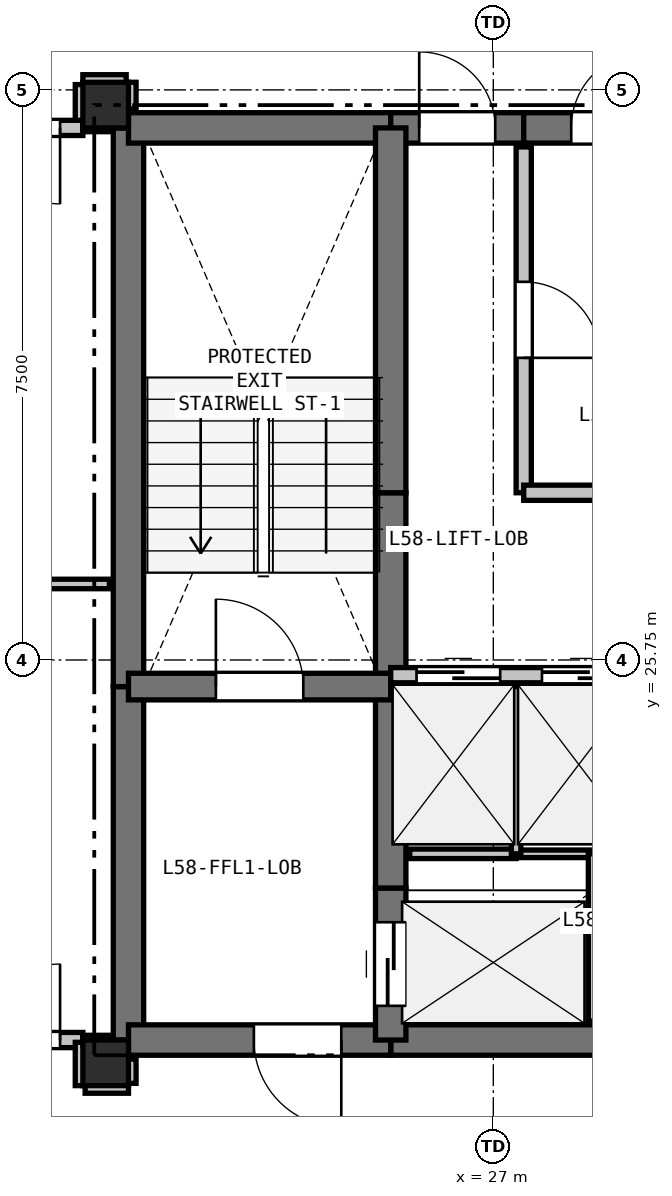
"""IFC4 building model, lengths in metres.
Left out: names, types, materials, properties, quantities, classifications, styles, units other than length and angle.
Written with IfcOpenShell. Run it as: python <this file> out.ifc"""

import sys

from ifc_helpers import new_model, si_unit, direction, frame, frame_2d, origin, origin_2d, place, context, subcontext, project, spatial, rectangle, extrude, element, fill, save


model = new_model("IFC4")
c1 = context("Model", 3, precision=1e-05, world=origin(), true_north=direction((0.0, 1.0)))
c2 = subcontext(c1, "Body", "Model", "MODEL_VIEW")
j1 = project(units=[si_unit("LENGTHUNIT", "METRE"), si_unit("PLANEANGLEUNIT", "RADIAN")], contexts=[c1])
p1 = place(None, origin())
s1 = spatial("IfcSite", under=j1, at=p1, CompositionType="ELEMENT")
p2 = place(p1, origin())
s2 = spatial("IfcBuilding", under=s1, at=p2, CompositionType="ELEMENT")
p3 = place(p2, frame((0.0, 0.0, 208.5)))
s3 = spatial("IfcBuildingStorey", under=s2, at=p3, CompositionType="ELEMENT", Elevation=208.5)
for number, where, z_axis, x_axis in (
    (1, (21.9, 20.45, 0.0), (0.0, 0.0, 1.0), (1.0, 0.0, 0.0)),
    (2, (21.9, 33.05, 0.0), (0.0, 0.0, 1.0), (1.0, 0.0, 0.0)),
):
    element("IfcColumn", number, at=place(p3, frame(where, z_axis=z_axis, x_axis=x_axis)), inside=s3, PredefinedType="COLUMN", context=c2, shape_type="SweptSolid", body=[
        extrude(rectangle(XDim=0.6, YDim=0.6, at=origin_2d()), origin(), (0.0, 0.0, 1.0), 3.3),
    ])
p4 = place(p3, frame((22.2, 20.75, 0.0), z_axis=(0.0, 0.0, 1.0), x_axis=(0.0, 1.0, 0.0)))
e3 = element("IfcWall", 3, at=p4, inside=s3, PredefinedType="SHEAR", context=c2, shape_type="SweptSolid", body=[
    extrude(rectangle(XDim=4.65, YDim=0.4, at=frame_2d((2.325, 0.0))), origin(), (0.0, 0.0, 1.0), 3.07),
])
p5 = place(p3, frame((22.2, 25.4, 0.0), z_axis=(0.0, 0.0, 1.0), x_axis=(0.0, 1.0, 0.0)))
e4 = element("IfcWall", 4, at=p5, inside=s3, PredefinedType="SHEAR", context=c2, shape_type="SweptSolid", body=[
    extrude(rectangle(XDim=7.35, YDim=0.4, at=frame_2d((3.675, 0.0))), origin(), (0.0, 0.0, 1.0), 3.07),
])
p6 = place(p3, frame((22.2, 32.75, 0.0), z_axis=(0.0, 0.0, 1.0), x_axis=(1.0, 0.0, 0.0)))
e5 = element("IfcWall", 5, at=p6, inside=s3, PredefinedType="SHEAR", context=c2, shape_type="SweptSolid", body=[
    extrude(rectangle(XDim=3.45, YDim=0.4, at=frame_2d((1.725, 0.0))), origin(), (0.0, 0.0, 1.0), 3.07),
])
p7 = place(p3, frame((25.65, 32.75, 0.0), z_axis=(0.0, 0.0, 1.0), x_axis=(1.0, 0.0, 0.0)))
e6 = element("IfcWall", 6, at=p7, inside=s3, PredefinedType="SHEAR", context=c2, shape_type="SweptSolid", body=[
    extrude(rectangle(XDim=1.75, YDim=0.4, at=frame_2d((0.875, 0.0))), origin(), (0.0, 0.0, 1.0), 3.07),
])
p8 = place(p7, frame((0.375, 0.0, 0.0)))
e7 = element("IfcOpeningElement", 7, at=p8, cuts=e6, PredefinedType="OPENING", context=c2, shape_type="SweptSolid", body=[
    extrude(rectangle(XDim=1.0, YDim=2.15, at=frame_2d((0.5, 1.075))), frame((0.0, 0.21, 0.0), z_axis=(0.0, -1.0, 0.0), x_axis=(1.0, 0.0, 0.0)), (0.0, 0.0, 1.0), 0.42),
])
p9 = place(p3, frame((27.4, 32.75, 0.0), z_axis=(0.0, 0.0, 1.0), x_axis=(1.0, 0.0, 0.0)))
e8 = element("IfcWall", 8, at=p9, inside=s3, PredefinedType="SHEAR", context=c2, shape_type="SweptSolid", body=[
    extrude(rectangle(XDim=2.25, YDim=0.4, at=frame_2d((1.125, 0.0))), origin(), (0.0, 0.0, 1.0), 3.07),
])
p10 = place(p9, frame((0.625, 0.0, 0.0)))
e9 = element("IfcOpeningElement", 9, at=p10, cuts=e8, PredefinedType="OPENING", context=c2, shape_type="SweptSolid", body=[
    extrude(rectangle(XDim=1.0, YDim=2.15, at=frame_2d((0.5, 1.075))), frame((0.0, 0.21, 0.0), z_axis=(0.0, -1.0, 0.0), x_axis=(1.0, 0.0, 0.0)), (0.0, 0.0, 1.0), 0.42),
])
p11 = place(p3, frame((28.35, 20.75, 0.0), z_axis=(0.0, 0.0, 1.0), x_axis=(-1.0, 0.0, 0.0)))
e10 = element("IfcWall", 10, at=p11, inside=s3, PredefinedType="SHEAR", context=c2, shape_type="SweptSolid", body=[
    extrude(rectangle(XDim=2.7, YDim=0.4, at=frame_2d((1.35, 0.0))), origin(), (0.0, 0.0, 1.0), 3.07),
])
p12 = place(p3, frame((25.65, 20.75, 0.0), z_axis=(0.0, 0.0, 1.0), x_axis=(-1.0, 0.0, 0.0)))
e11 = element("IfcWall", 11, at=p12, inside=s3, PredefinedType="SHEAR", context=c2, shape_type="SweptSolid", body=[
    extrude(rectangle(XDim=3.45, YDim=0.4, at=frame_2d((1.725, 0.0))), origin(), (0.0, 0.0, 1.0), 3.07),
])
p13 = place(p12, frame((0.65, 0.0, 0.0)))
e12 = element("IfcOpeningElement", 12, at=p13, cuts=e11, PredefinedType="OPENING", context=c2, shape_type="SweptSolid", body=[
    extrude(rectangle(XDim=1.15, YDim=2.15, at=frame_2d((0.575, 1.075))), frame((0.0, 0.21, 0.0), z_axis=(0.0, -1.0, 0.0), x_axis=(1.0, 0.0, 0.0)), (0.0, 0.0, 1.0), 0.42),
])
p14 = place(p3, frame((25.65, 20.75, 0.0), z_axis=(0.0, 0.0, 1.0), x_axis=(0.0, 1.0, 0.0)))
e13 = element("IfcWall", 13, at=p14, inside=s3, PredefinedType="SHEAR", context=c2, shape_type="SweptSolid", body=[
    extrude(rectangle(XDim=2.0, YDim=0.4, at=frame_2d((1.0, 0.0))), origin(), (0.0, 0.0, 1.0), 3.07),
])
p15 = place(p14, frame((0.45, 0.0, 0.0)))
e14 = element("IfcOpeningElement", 14, at=p15, cuts=e13, PredefinedType="OPENING", context=c2, shape_type="SweptSolid", body=[
    extrude(rectangle(XDim=1.1, YDim=2.15, at=frame_2d((0.55, 1.075))), frame((0.0, 0.21, 0.0), z_axis=(0.0, -1.0, 0.0), x_axis=(1.0, 0.0, 0.0)), (0.0, 0.0, 1.0), 0.42),
])
p16 = place(p3, frame((25.65, 22.75, 0.0), z_axis=(0.0, 0.0, 1.0), x_axis=(0.0, 1.0, 0.0)))
e15 = element("IfcWall", 15, at=p16, inside=s3, PredefinedType="SHEAR", context=c2, shape_type="SweptSolid", body=[
    extrude(rectangle(XDim=2.8, YDim=0.4, at=frame_2d((1.4, 0.0))), origin(), (0.0, 0.0, 1.0), 3.07),
])
p17 = place(p3, frame((25.65, 25.55, 0.0), z_axis=(0.0, 0.0, 1.0), x_axis=(0.0, 1.0, 0.0)))
e16 = element("IfcWall", 16, at=p17, inside=s3, PredefinedType="SHEAR", context=c2, shape_type="SweptSolid", body=[
    extrude(rectangle(XDim=2.4, YDim=0.4, at=frame_2d((1.2, 0.0))), origin(), (0.0, 0.0, 1.0), 3.07),
])
p18 = place(p3, frame((25.65, 27.95, 0.0), z_axis=(0.0, 0.0, 1.0), x_axis=(0.0, 1.0, 0.0)))
e17 = element("IfcWall", 17, at=p18, inside=s3, PredefinedType="SHEAR", context=c2, shape_type="SweptSolid", body=[
    extrude(rectangle(XDim=4.8, YDim=0.4, at=frame_2d((2.4, 0.0))), origin(), (0.0, 0.0, 1.0), 3.07),
])
p19 = place(p3, frame((22.2, 25.4, 0.0), z_axis=(0.0, 0.0, 1.0), x_axis=(1.0, 0.0, 0.0)))
e18 = element("IfcWall", 18, at=p19, inside=s3, PredefinedType="SHEAR", context=c2, shape_type="SweptSolid", body=[
    extrude(rectangle(XDim=3.45, YDim=0.35, at=frame_2d((1.725, 0.0))), origin(), (0.0, 0.0, 1.0), 3.07),
])
p20 = place(p19, frame((1.15, 0.0, 0.0)))
e19 = element("IfcOpeningElement", 19, at=p20, cuts=e18, PredefinedType="OPENING", context=c2, shape_type="SweptSolid", body=[
    extrude(rectangle(XDim=1.15, YDim=2.15, at=frame_2d((0.575, 1.075))), frame((0.0, 0.185, 0.0), z_axis=(0.0, -1.0, 0.0), x_axis=(1.0, 0.0, 0.0)), (0.0, 0.0, 1.0), 0.37),
])
p21 = place(p3, frame((25.65, 25.55, 0.0), z_axis=(0.0, 0.0, 1.0), x_axis=(1.0, 0.0, 0.0)))
e20 = element("IfcWall", 20, at=p21, inside=s3, PredefinedType="PARTITIONING", context=c2, shape_type="SweptSolid", body=[
    extrude(rectangle(XDim=4.95, YDim=0.2, at=frame_2d((2.475, 0.0))), origin(), (0.0, 0.0, 1.0), 3.07),
])
p22 = place(p21, frame((0.34, 0.0, 0.0)))
e21 = element("IfcOpeningElement", 21, at=p22, cuts=e20, PredefinedType="OPENING", context=c2, shape_type="SweptSolid", body=[
    extrude(rectangle(XDim=1.1, YDim=2.15, at=frame_2d((0.55, 1.075))), frame((0.0, 0.11, 0.0), z_axis=(0.0, -1.0, 0.0), x_axis=(1.0, 0.0, 0.0)), (0.0, 0.0, 1.0), 0.22),
])
p23 = place(p21, frame((1.99, 0.0, 0.0)))
e22 = element("IfcOpeningElement", 22, at=p23, cuts=e20, PredefinedType="OPENING", context=c2, shape_type="SweptSolid", body=[
    extrude(rectangle(XDim=1.1, YDim=2.15, at=frame_2d((0.55, 1.075))), frame((0.0, 0.11, 0.0), z_axis=(0.0, -1.0, 0.0), x_axis=(1.0, 0.0, 0.0)), (0.0, 0.0, 1.0), 0.22),
])
p24 = place(p21, frame((3.64, 0.0, 0.0)))
e23 = element("IfcOpeningElement", 23, at=p24, cuts=e20, PredefinedType="OPENING", context=c2, shape_type="SweptSolid", body=[
    extrude(rectangle(XDim=1.1, YDim=2.15, at=frame_2d((0.55, 1.075))), frame((0.0, 0.11, 0.0), z_axis=(0.0, -1.0, 0.0), x_axis=(1.0, 0.0, 0.0)), (0.0, 0.0, 1.0), 0.22),
])
p25 = place(p3, frame((25.9, 23.2, 0.0), z_axis=(0.0, 0.0, 1.0), x_axis=(1.0, 0.0, 0.0)))
e24 = element("IfcWall", 24, at=p25, inside=s3, PredefinedType="PARTITIONING", context=c2, shape_type="SweptSolid", body=[
    extrude(rectangle(XDim=1.4, YDim=0.125, at=frame_2d((0.7, 0.0))), origin(), (0.0, 0.0, 1.0), 3.07),
])
p26 = place(p3, frame((27.3, 23.2, 0.0), z_axis=(0.0, 0.0, 1.0), x_axis=(1.0, 0.0, 0.0)))
e25 = element("IfcWall", 25, at=p26, inside=s3, PredefinedType="PARTITIONING", context=c2, shape_type="SweptSolid", body=[
    extrude(rectangle(XDim=1.05, YDim=0.1, at=frame_2d((0.525, 0.0))), origin(), (0.0, 0.0, 1.0), 3.07),
])
p27 = place(p3, frame((28.35, 23.2, 0.0), z_axis=(0.0, 0.0, 1.0), x_axis=(0.0, -1.0, 0.0)))
e26 = element("IfcWall", 26, at=p27, inside=s3, PredefinedType="PARTITIONING", context=c2, shape_type="SweptSolid", body=[
    extrude(rectangle(XDim=2.2, YDim=0.2, at=frame_2d((1.1, 0.0))), origin(), (0.0, 0.0, 1.0), 3.07),
])
p28 = place(p3, frame((27.3, 25.4, 0.0), z_axis=(0.0, 0.0, 1.0), x_axis=(0.0, -1.0, 0.0)))
e27 = element("IfcWall", 27, at=p28, inside=s3, PredefinedType="PARTITIONING", context=c2, shape_type="SweptSolid", body=[
    extrude(rectangle(XDim=2.2, YDim=0.125, at=frame_2d((1.1, 0.0))), origin(), (0.0, 0.0, 1.0), 3.07),
])
p29 = place(p3, frame((27.4, 32.5, 0.0), z_axis=(0.0, 0.0, 1.0), x_axis=(0.0, -1.0, 0.0)))
e28 = element("IfcWall", 28, at=p29, inside=s3, PredefinedType="PARTITIONING", context=c2, shape_type="SweptSolid", body=[
    extrude(rectangle(XDim=4.55, YDim=0.2, at=frame_2d((2.275, 0.0))), origin(), (0.0, 0.0, 1.0), 3.07),
])
p30 = place(p29, frame((1.775, 0.0, 0.0)))
e29 = element("IfcOpeningElement", 29, at=p30, cuts=e28, PredefinedType="OPENING", context=c2, shape_type="SweptSolid", body=[
    extrude(rectangle(XDim=1.0, YDim=2.15, at=frame_2d((0.5, 1.075))), frame((0.0, 0.11, 0.0), z_axis=(0.0, -1.0, 0.0), x_axis=(1.0, 0.0, 0.0)), (0.0, 0.0, 1.0), 0.22),
])
p31 = place(p3, frame((27.4, 27.95, 0.0), z_axis=(0.0, 0.0, 1.0), x_axis=(1.0, 0.0, 0.0)))
e30 = element("IfcWall", 30, at=p31, inside=s3, PredefinedType="PARTITIONING", context=c2, shape_type="SweptSolid", body=[
    extrude(rectangle(XDim=2.45, YDim=0.2, at=frame_2d((1.225, 0.0))), origin(), (0.0, 0.0, 1.0), 3.07),
])
p32 = place(p3, frame((22.2, 33.0, 0.0), z_axis=(0.0, 0.0, 1.0), x_axis=(0.0, 1.0, 0.0)))
e31 = element("IfcWall", 31, at=p32, inside=s3, PredefinedType="PARTITIONING", context=c2, shape_type="SweptSolid", body=[
    extrude(rectangle(XDim=0.35, YDim=0.2, at=frame_2d((0.175, 0.0))), origin(), (0.0, 0.0, 1.0), 2.595),
])
p33 = place(p3, frame((22.17, 33.35, 0.0), z_axis=(0.0, 0.0, 1.0), x_axis=(-1.0, 0.0, 0.0)))
e32 = element("IfcWall", 32, at=p33, inside=s3, PredefinedType="PARTITIONING", context=c2, shape_type="SweptSolid", body=[
    extrude(rectangle(XDim=0.57, YDim=0.2, at=frame_2d((0.285, 0.0))), origin(), (0.0, 0.0, 1.0), 3.07),
])
p34 = place(p3, frame((21.6, 33.32, 0.0), z_axis=(0.0, 0.0, 1.0), x_axis=(0.0, -1.0, 0.0)))
e33 = element("IfcWall", 33, at=p34, inside=s3, PredefinedType="PARTITIONING", context=c2, shape_type="SweptSolid", body=[
    extrude(rectangle(XDim=0.57, YDim=0.2, at=frame_2d((0.285, 0.0))), origin(), (0.0, 0.0, 1.0), 2.518),
])
p35 = place(p3, frame((21.6, 32.75, 0.0), z_axis=(0.0, 0.0, 1.0), x_axis=(-1.0, 0.0, 0.0)))
e34 = element("IfcWall", 34, at=p35, inside=s3, PredefinedType="PARTITIONING", context=c2, shape_type="SweptSolid", body=[
    extrude(rectangle(XDim=1.6, YDim=0.2, at=frame_2d((0.8, 0.0))), origin(), (0.0, 0.0, 1.0), 2.518),
])
p36 = place(p35, frame((0.3, 0.0, 0.0)))
e35 = element("IfcOpeningElement", 35, at=p36, cuts=e34, PredefinedType="OPENING", context=c2, shape_type="SweptSolid", body=[
    extrude(rectangle(XDim=1.0, YDim=2.15, at=frame_2d((0.5, 1.075))), frame((0.0, 0.11, 0.0), z_axis=(0.0, -1.0, 0.0), x_axis=(1.0, 0.0, 0.0)), (0.0, 0.0, 1.0), 0.22),
])
p37 = place(p3, frame((20.0, 20.75, 0.0), z_axis=(0.0, 0.0, 1.0), x_axis=(1.0, 0.0, 0.0)))
e36 = element("IfcWall", 36, at=p37, inside=s3, PredefinedType="PARTITIONING", context=c2, shape_type="SweptSolid", body=[
    extrude(rectangle(XDim=1.6, YDim=0.2, at=frame_2d((0.8, 0.0))), origin(), (0.0, 0.0, 1.0), 2.518),
])
p38 = place(p37, frame((0.3, 0.0, 0.0)))
e37 = element("IfcOpeningElement", 37, at=p38, cuts=e36, PredefinedType="OPENING", context=c2, shape_type="SweptSolid", body=[
    extrude(rectangle(XDim=1.0, YDim=2.15, at=frame_2d((0.5, 1.075))), frame((0.0, 0.11, 0.0), z_axis=(0.0, -1.0, 0.0), x_axis=(1.0, 0.0, 0.0)), (0.0, 0.0, 1.0), 0.22),
])
for number, where, z_axis, x_axis in (
    (38, (21.6, 20.72, 0.0), (0.0, 0.0, 1.0), (0.0, -1.0, 0.0)),
    (39, (21.63, 20.15, 0.0), (0.0, 0.0, 1.0), (1.0, 0.0, 0.0)),
):
    element("IfcWall", number, at=place(p3, frame(where, z_axis=z_axis, x_axis=x_axis)), inside=s3, PredefinedType="PARTITIONING", context=c2, shape_type="SweptSolid", body=[
        extrude(rectangle(XDim=0.57, YDim=0.2, at=frame_2d((0.285, 0.0))), origin(), (0.0, 0.0, 1.0), 2.518),
    ])
p39 = place(p3, frame((22.2, 20.18, 0.0), z_axis=(0.0, 0.0, 1.0), x_axis=(0.0, 1.0, 0.0)))
e40 = element("IfcWall", 40, at=p39, inside=s3, PredefinedType="PARTITIONING", context=c2, shape_type="SweptSolid", body=[
    extrude(rectangle(XDim=0.32, YDim=0.2, at=frame_2d((0.16, 0.0))), origin(), (0.0, 0.0, 1.0), 2.518),
])
p40 = place(p3, frame((21.6, 32.75, 0.0), z_axis=(0.0, 0.0, 1.0), x_axis=(1.0, 0.0, 0.0)))
e41 = element("IfcWall", 41, at=p40, inside=s3, PredefinedType="PARTITIONING", context=c2, shape_type="SweptSolid", body=[
    extrude(rectangle(XDim=0.35, YDim=0.1, at=frame_2d((0.175, 0.0))), origin(), (0.0, 0.0, 1.0), 2.595),
])
p41 = place(p3, frame((21.95, 26.75, 0.0), z_axis=(0.0, 0.0, 1.0), x_axis=(-1.0, 0.0, 0.0)))
e42 = element("IfcWall", 42, at=p41, inside=s3, PredefinedType="PARTITIONING", context=c2, shape_type="SweptSolid", body=[
    extrude(rectangle(XDim=12.506, YDim=0.125, at=frame_2d((6.253, 0.0))), origin(), (0.0, 0.0, 1.0), 2.595),
])
p42 = place(p3, frame((21.95, 20.75, 0.0), z_axis=(0.0, 0.0, 1.0), x_axis=(-1.0, 0.0, 0.0)))
e43 = element("IfcWall", 43, at=p42, inside=s3, PredefinedType="PARTITIONING", context=c2, shape_type="SweptSolid", body=[
    extrude(rectangle(XDim=0.35, YDim=0.125, at=frame_2d((0.175, 0.0))), origin(), (0.0, 0.0, 1.0), 2.595),
])
p43 = place(p22, origin())
e44 = element("IfcDoor", 44, at=p43, inside=s3, OperationType="SLIDING_TO_LEFT", PredefinedType="DOOR", context=c2, shape_type="SweptSolid", body=[
    extrude(rectangle(XDim=1.1, YDim=2.15, at=frame_2d((0.55, 1.075))), frame((0.0, 0.025, 0.0), z_axis=(0.0, -1.0, 0.0), x_axis=(1.0, 0.0, 0.0)), (0.0, 0.0, 1.0), 0.05),
])
fill(e21, e44)
p44 = place(p23, origin())
e45 = element("IfcDoor", 45, at=p44, inside=s3, OperationType="SLIDING_TO_LEFT", PredefinedType="DOOR", context=c2, shape_type="SweptSolid", body=[
    extrude(rectangle(XDim=1.1, YDim=2.15, at=frame_2d((0.55, 1.075))), frame((0.0, 0.025, 0.0), z_axis=(0.0, -1.0, 0.0), x_axis=(1.0, 0.0, 0.0)), (0.0, 0.0, 1.0), 0.05),
])
fill(e22, e45)
p45 = place(p8, origin())
e46 = element("IfcDoor", 46, at=p45, inside=s3, OperationType="SINGLE_SWING_LEFT", PredefinedType="DOOR", context=c2, shape_type="SweptSolid", body=[
    extrude(rectangle(XDim=1.0, YDim=2.15, at=frame_2d((0.5, 1.075))), frame((0.0, 0.025, 0.0), z_axis=(0.0, -1.0, 0.0), x_axis=(1.0, 0.0, 0.0)), (0.0, 0.0, 1.0), 0.05),
])
fill(e7, e46)
p46 = place(p15, origin())
e47 = element("IfcDoor", 47, at=p46, inside=s3, OperationType="SLIDING_TO_LEFT", PredefinedType="DOOR", context=c2, shape_type="SweptSolid", body=[
    extrude(rectangle(XDim=1.1, YDim=2.15, at=frame_2d((0.55, 1.075))), frame((0.0, 0.025, 0.0), z_axis=(0.0, -1.0, 0.0), x_axis=(1.0, 0.0, 0.0)), (0.0, 0.0, 1.0), 0.05),
])
fill(e14, e47)
p47 = place(p20, origin())
e48 = element("IfcDoor", 48, at=p47, inside=s3, OperationType="SINGLE_SWING_LEFT", PredefinedType="DOOR", context=c2, shape_type="SweptSolid", body=[
    extrude(rectangle(XDim=1.15, YDim=2.15, at=frame_2d((0.575, 1.075))), frame((0.0, 0.025, 0.0), z_axis=(0.0, -1.0, 0.0), x_axis=(1.0, 0.0, 0.0)), (0.0, 0.0, 1.0), 0.05),
])
fill(e19, e48)
p48 = place(p13, origin())
e49 = element("IfcDoor", 49, at=p48, inside=s3, OperationType="SINGLE_SWING_LEFT", PredefinedType="DOOR", context=c2, shape_type="SweptSolid", body=[
    extrude(rectangle(XDim=1.15, YDim=2.15, at=frame_2d((0.575, 1.075))), frame((0.0, 0.025, 0.0), z_axis=(0.0, -1.0, 0.0), x_axis=(1.0, 0.0, 0.0)), (0.0, 0.0, 1.0), 0.05),
])
fill(e12, e49)
p49 = place(p30, origin())
e50 = element("IfcDoor", 50, at=p49, inside=s3, OperationType="SINGLE_SWING_RIGHT", PredefinedType="DOOR", context=c2, shape_type="SweptSolid", body=[
    extrude(rectangle(XDim=1.0, YDim=2.15, at=frame_2d((0.5, 1.075))), frame((0.0, 0.025, 0.0), z_axis=(0.0, -1.0, 0.0), x_axis=(1.0, 0.0, 0.0)), (0.0, 0.0, 1.0), 0.05),
])
fill(e29, e50)
p50 = place(p10, origin())
e51 = element("IfcDoor", 51, at=p50, inside=s3, OperationType="SINGLE_SWING_RIGHT", PredefinedType="DOOR", context=c2, shape_type="SweptSolid", body=[
    extrude(rectangle(XDim=1.0, YDim=2.15, at=frame_2d((0.5, 1.075))), frame((0.0, 0.025, 0.0), z_axis=(0.0, -1.0, 0.0), x_axis=(1.0, 0.0, 0.0)), (0.0, 0.0, 1.0), 0.05),
])
fill(e9, e51)
p51 = place(p36, origin())
e52 = element("IfcDoor", 52, at=p51, inside=s3, OperationType="SINGLE_SWING_LEFT", PredefinedType="DOOR", context=c2, shape_type="SweptSolid", body=[
    extrude(rectangle(XDim=1.0, YDim=2.15, at=frame_2d((0.5, 1.075))), frame((0.0, 0.025, 0.0), z_axis=(0.0, -1.0, 0.0), x_axis=(1.0, 0.0, 0.0)), (0.0, 0.0, 1.0), 0.05),
])
fill(e35, e52)
p52 = place(p38, origin())
e53 = element("IfcDoor", 53, at=p52, inside=s3, OperationType="SINGLE_SWING_RIGHT", PredefinedType="DOOR", context=c2, shape_type="SweptSolid", body=[
    extrude(rectangle(XDim=1.0, YDim=2.15, at=frame_2d((0.5, 1.075))), frame((0.0, 0.025, 0.0), z_axis=(0.0, -1.0, 0.0), x_axis=(1.0, 0.0, 0.0)), (0.0, 0.0, 1.0), 0.05),
])
fill(e37, e53)
save(model, sys.argv[1])
